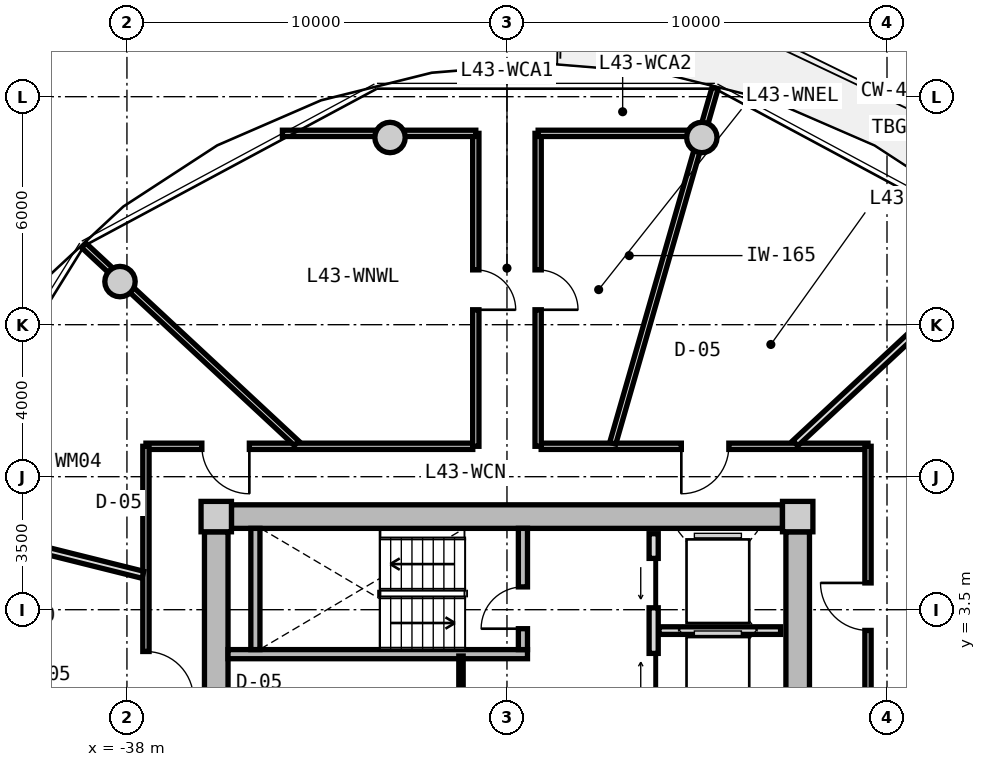
"""IFC4 building model, lengths in metres.
Left out: names, types, materials, properties, quantities, classifications, styles, units other than length and angle.
Written with IfcOpenShell. Run it as: python <this file> out.ifc"""

import sys

from ifc_helpers import new_model, si_unit, direction, frame, frame_2d, origin, origin_2d, place, context, subcontext, project, spatial, rectangle, circle, extrude, source, transform, mapped, element, fill, save


model = new_model("IFC4")
c1 = context("Model", 3, precision=1e-05, world=origin(), true_north=direction((0.0, 1.0)))
c2 = subcontext(c1, "Body", "Model", "MODEL_VIEW")
j1 = project(units=[si_unit("LENGTHUNIT", "METRE"), si_unit("PLANEANGLEUNIT", "RADIAN")], contexts=[c1])
p1 = place(None, origin())
s1 = spatial("IfcSite", under=j1, at=p1, CompositionType="ELEMENT")
p2 = place(p1, origin())
s2 = spatial("IfcBuilding", under=s1, at=p2, CompositionType="ELEMENT")
p3 = place(p2, frame((0.0, 0.0, 140.4)))
s3 = spatial("IfcBuildingStorey", under=s2, at=p3, CompositionType="ELEMENT", Elevation=140.4)
m1 = source(origin(), c2, "Body", "SweptSolid", [
    extrude(rectangle(XDim=0.8, YDim=0.8, at=origin_2d()), origin(), (0.0, 0.0, 1.0), 3.05),
])
for number, where, z_axis, x_axis in (
    (1, (-20.35, 5.95, 0.0), (0.0, 0.0, 1.0), (1.0, 0.0, 0.0)),
    (2, (-35.65, 5.95, 0.0), (0.0, 0.0, 1.0), (1.0, 0.0, 0.0)),
):
    element("IfcColumn", number, at=place(p3, frame(where, z_axis=z_axis, x_axis=x_axis)), inside=s3, PredefinedType="COLUMN", context=c2, shape_type="MappedRepresentation", body=[
        mapped(m1, transform((0.0, 0.0, 0.0), x_axis=(1.0, 0.0, 0.0), y_axis=(0.0, 1.0, 0.0), z_axis=(0.0, 0.0, 1.0), scale=1.0)),
    ])
m2 = source(origin(), c2, "Body", "SweptSolid", [
    extrude(rectangle(XDim=14.5, YDim=0.62, at=frame_2d((7.25, 0.0))), origin(), (0.0, 0.0, 1.0), 2.81),
])
p4 = place(p3, frame((-35.25, 5.95, 0.0), z_axis=(0.0, 0.0, 1.0), x_axis=(1.0, 0.0, 0.0)))
e3 = element("IfcWall", 3, at=p4, inside=s3, PredefinedType="SHEAR", context=c2, shape_type="MappedRepresentation", body=[
    mapped(m2, transform((0.0, 0.0, 0.0), x_axis=(1.0, 0.0, 0.0), y_axis=(0.0, 1.0, 0.0), z_axis=(0.0, 0.0, 1.0), scale=1.0)),
])
m3 = source(origin(), c2, "Body", "SweptSolid", [
    extrude(rectangle(XDim=11.1, YDim=0.62, at=frame_2d((5.55, 0.0))), origin(), (0.0, 0.0, 1.0), 2.81),
])
p5 = place(p3, frame((-35.65, -5.55, 0.0), z_axis=(0.0, 0.0, 1.0), x_axis=(0.0, 1.0, 0.0)))
e4 = element("IfcWall", 4, at=p5, inside=s3, PredefinedType="SHEAR", context=c2, shape_type="MappedRepresentation", body=[
    mapped(m3, transform((0.0, 0.0, 0.0), x_axis=(1.0, 0.0, 0.0), y_axis=(0.0, 1.0, 0.0), z_axis=(0.0, 0.0, 1.0), scale=1.0)),
])
p6 = place(p5, frame((3.8, 0.0, 0.0)))
e5 = element("IfcOpeningElement", 5, at=p6, cuts=e4, PredefinedType="OPENING", context=c2, shape_type="SweptSolid", body=[
    extrude(rectangle(XDim=1.2, YDim=2.15, at=frame_2d((0.6, 1.075))), frame((0.0, 0.32, 0.0), z_axis=(0.0, -1.0, 0.0), x_axis=(1.0, 0.0, 0.0)), (0.0, 0.0, 1.0), 0.64),
])
p7 = place(p3, frame((-20.35, 5.55, 0.0), z_axis=(0.0, 0.0, 1.0), x_axis=(0.0, -1.0, 0.0)))
e6 = element("IfcWall", 6, at=p7, inside=s3, PredefinedType="SHEAR", context=c2, shape_type="MappedRepresentation", body=[
    mapped(m3, transform((0.0, 0.0, 0.0), x_axis=(1.0, 0.0, 0.0), y_axis=(0.0, 1.0, 0.0), z_axis=(0.0, 0.0, 1.0), scale=1.0)),
])
p8 = place(p7, frame((5.65, 0.0, 0.0)))
e7 = element("IfcOpeningElement", 7, at=p8, cuts=e6, PredefinedType="OPENING", context=c2, shape_type="SweptSolid", body=[
    extrude(rectangle(XDim=1.2, YDim=2.15, at=frame_2d((0.6, 1.075))), frame((0.0, 0.32, 0.0), z_axis=(0.0, -1.0, 0.0), x_axis=(1.0, 0.0, 0.0)), (0.0, 0.0, 1.0), 0.64),
])
m4 = source(origin(), c2, "Body", "SweptSolid", [
    extrude(circle(Radius=0.4, at=origin_2d()), origin(), (0.0, 0.0, 1.0), 3.05),
])
for number, where, z_axis, x_axis in (
    (8, (-22.873, 15.926, 0.0), (0.0, 0.0, 1.0), (1.0, 0.0, 0.0)),
    (9, (-31.077, 15.926, 0.0), (0.0, 0.0, 1.0), (1.0, 0.0, 0.0)),
    (10, (-38.183, 12.135, 0.0), (0.0, 0.0, 1.0), (1.0, 0.0, 0.0)),
):
    element("IfcColumn", number, at=place(p3, frame(where, z_axis=z_axis, x_axis=x_axis)), inside=s3, PredefinedType="COLUMN", context=c2, shape_type="MappedRepresentation", body=[
        mapped(m4, transform((0.0, 0.0, 0.0), x_axis=(1.0, 0.0, 0.0), y_axis=(0.0, 1.0, 0.0), z_axis=(0.0, 0.0, 1.0), scale=1.0)),
    ])
m5 = source(origin(), c2, "Body", "SweptSolid", [
    extrude(rectangle(XDim=7.88, YDim=0.24, at=frame_2d((3.94, 0.0))), origin(), (0.0, 0.0, 1.0), 2.81),
])
p9 = place(p3, frame((-35.34, 2.33, 0.0), z_axis=(0.0, 0.0, 1.0), x_axis=(1.0, 0.0, 0.0)))
e11 = element("IfcWall", 11, at=p9, inside=s3, PredefinedType="PARTITIONING", context=c2, shape_type="MappedRepresentation", body=[
    mapped(m5, transform((0.0, 0.0, 0.0), x_axis=(1.0, 0.0, 0.0), y_axis=(0.0, 1.0, 0.0), z_axis=(0.0, 0.0, 1.0), scale=1.0)),
])
m6 = source(origin(), c2, "Body", "SweptSolid", [
    extrude(rectangle(XDim=3.19, YDim=0.24, at=frame_2d((1.595, 0.0))), origin(), (0.0, 0.0, 1.0), 2.81),
])
p10 = place(p3, frame((-34.62, 2.45, 0.0), z_axis=(0.0, 0.0, 1.0), x_axis=(0.0, 1.0, 0.0)))
e12 = element("IfcWall", 12, at=p10, inside=s3, PredefinedType="PARTITIONING", context=c2, shape_type="MappedRepresentation", body=[
    mapped(m6, transform((0.0, 0.0, 0.0), x_axis=(1.0, 0.0, 0.0), y_axis=(0.0, 1.0, 0.0), z_axis=(0.0, 0.0, 1.0), scale=1.0)),
])
p11 = place(p3, frame((-27.58, 2.45, 0.0), z_axis=(0.0, 0.0, 1.0), x_axis=(0.0, 1.0, 0.0)))
e13 = element("IfcWall", 13, at=p11, inside=s3, PredefinedType="PARTITIONING", context=c2, shape_type="MappedRepresentation", body=[
    mapped(m6, transform((0.0, 0.0, 0.0), x_axis=(1.0, 0.0, 0.0), y_axis=(0.0, 1.0, 0.0), z_axis=(0.0, 0.0, 1.0), scale=1.0)),
])
p12 = place(p11, frame((0.55, 0.0, 0.0)))
e14 = element("IfcOpeningElement", 14, at=p12, cuts=e13, PredefinedType="OPENING", context=c2, shape_type="SweptSolid", body=[
    extrude(rectangle(XDim=1.1, YDim=2.15, at=frame_2d((0.55, 1.075))), frame((0.0, 0.13, 0.0), z_axis=(0.0, -1.0, 0.0), x_axis=(1.0, 0.0, 0.0)), (0.0, 0.0, 1.0), 0.26),
])
m7 = source(origin(), c2, "Body", "SweptSolid", [
    extrude(rectangle(XDim=5.0, YDim=0.24, at=frame_2d((2.5, 0.0))), origin(), (0.0, 0.0, 1.0), 2.795),
])
p13 = place(p3, frame((-24.14, 0.5, 0.0), z_axis=(0.0, 0.0, 1.0), x_axis=(0.0, 1.0, 0.0)))
e15 = element("IfcWall", 15, at=p13, inside=s3, PredefinedType="PARTITIONING", context=c2, shape_type="MappedRepresentation", body=[
    mapped(m7, transform((0.0, 0.0, 0.0), x_axis=(1.0, 0.0, 0.0), y_axis=(0.0, 1.0, 0.0), z_axis=(0.0, 0.0, 1.0), scale=1.0)),
])
p14 = place(p13, frame((3.05, 0.0, 0.0)))
e16 = element("IfcOpeningElement", 16, at=p14, cuts=e15, PredefinedType="OPENING", context=c2, shape_type="SweptSolid", body=[
    extrude(rectangle(XDim=1.3, YDim=2.2, at=frame_2d((0.65, 1.1))), frame((0.0, 0.13, 0.0), z_axis=(0.0, -1.0, 0.0), x_axis=(1.0, 0.0, 0.0)), (0.0, 0.0, 1.0), 0.26),
])
p15 = place(p13, frame((0.55, 0.0, 0.0)))
e17 = element("IfcOpeningElement", 17, at=p15, cuts=e15, PredefinedType="OPENING", context=c2, shape_type="SweptSolid", body=[
    extrude(rectangle(XDim=1.3, YDim=2.2, at=frame_2d((0.65, 1.1))), frame((0.0, 0.13, 0.0), z_axis=(0.0, -1.0, 0.0), x_axis=(1.0, 0.0, 0.0)), (0.0, 0.0, 1.0), 0.26),
])
m8 = source(origin(), c2, "Body", "SweptSolid", [
    extrude(rectangle(XDim=3.2, YDim=0.2, at=frame_2d((1.6, 0.0))), origin(), (0.0, 0.0, 1.0), 2.795),
])
p16 = place(p3, frame((-24.0, 2.95, 0.0), z_axis=(0.0, 0.0, 1.0), x_axis=(1.0, 0.0, 0.0)))
e18 = element("IfcWall", 18, at=p16, inside=s3, PredefinedType="PARTITIONING", context=c2, shape_type="MappedRepresentation", body=[
    mapped(m8, transform((0.0, 0.0, 0.0), x_axis=(1.0, 0.0, 0.0), y_axis=(0.0, 1.0, 0.0), z_axis=(0.0, 0.0, 1.0), scale=1.0)),
])
m9 = source(origin(), c2, "Body", "SweptSolid", [
    extrude(rectangle(XDim=2.33, YDim=0.115, at=frame_2d((1.165, 0.0))), origin(), (0.0, 0.0, 1.0), 2.795),
])
p17 = place(p3, frame((-29.21, -0.05, 0.0), z_axis=(0.0, 0.0, 1.0), x_axis=(0.0, 1.0, 0.0)))
e19 = element("IfcWall", 19, at=p17, inside=s3, PredefinedType="PARTITIONING", context=c2, shape_type="MappedRepresentation", body=[
    mapped(m9, transform((0.0, 0.0, 0.0), x_axis=(1.0, 0.0, 0.0), y_axis=(0.0, 1.0, 0.0), z_axis=(0.0, 0.0, 1.0), scale=1.0)),
])
m10 = source(origin(), c2, "Body", "SweptSolid", [
    extrude(rectangle(XDim=8.6, YDim=0.165, at=frame_2d((4.3, 0.0))), origin(), (0.0, 0.0, 1.0), 2.795),
])
p18 = place(p3, frame((-37.5, 7.8, 0.0), z_axis=(0.0, 0.0, 1.0), x_axis=(1.0, 0.0, 0.0)))
e20 = element("IfcWall", 20, at=p18, inside=s3, PredefinedType="PARTITIONING", context=c2, shape_type="MappedRepresentation", body=[
    mapped(m10, transform((0.0, 0.0, 0.0), x_axis=(1.0, 0.0, 0.0), y_axis=(0.0, 1.0, 0.0), z_axis=(0.0, 0.0, 1.0), scale=1.0)),
])
p19 = place(p18, frame((1.471, 0.0, 0.0)))
e21 = element("IfcOpeningElement", 21, at=p19, cuts=e20, PredefinedType="OPENING", context=c2, shape_type="SweptSolid", body=[
    extrude(rectangle(XDim=1.25, YDim=2.2, at=frame_2d((0.625, 1.1))), frame((0.0, 0.093, 0.0), z_axis=(0.0, -1.0, 0.0), x_axis=(1.0, 0.0, 0.0)), (0.0, 0.0, 1.0), 0.185),
])
p20 = place(p3, frame((-27.1, 7.8, 0.0), z_axis=(0.0, 0.0, 1.0), x_axis=(1.0, 0.0, 0.0)))
e22 = element("IfcWall", 22, at=p20, inside=s3, PredefinedType="PARTITIONING", context=c2, shape_type="MappedRepresentation", body=[
    mapped(m10, transform((0.0, 0.0, 0.0), x_axis=(1.0, 0.0, 0.0), y_axis=(0.0, 1.0, 0.0), z_axis=(0.0, 0.0, 1.0), scale=1.0)),
])
p21 = place(p20, frame((3.688, 0.0, 0.0)))
e23 = element("IfcOpeningElement", 23, at=p21, cuts=e22, PredefinedType="OPENING", context=c2, shape_type="SweptSolid", body=[
    extrude(rectangle(XDim=1.25, YDim=2.2, at=frame_2d((0.625, 1.1))), frame((0.0, 0.093, 0.0), z_axis=(0.0, -1.0, 0.0), x_axis=(1.0, 0.0, 0.0)), (0.0, 0.0, 1.0), 0.185),
])
m11 = source(origin(), c2, "Body", "SweptSolid", [
    extrude(rectangle(XDim=15.6, YDim=0.165, at=frame_2d((7.8, 0.0))), origin(), (0.0, 0.0, 1.0), 2.795),
])
p22 = place(p3, frame((-37.5, -7.8, 0.0), z_axis=(0.0, 0.0, 1.0), x_axis=(0.0, 1.0, 0.0)))
e24 = element("IfcWall", 24, at=p22, inside=s3, PredefinedType="PARTITIONING", context=c2, shape_type="MappedRepresentation", body=[
    mapped(m11, transform((0.0, 0.0, 0.0), x_axis=(1.0, 0.0, 0.0), y_axis=(0.0, 1.0, 0.0), z_axis=(0.0, 0.0, 1.0), scale=1.0)),
])
p23 = place(p22, frame((8.95, 0.0, 0.0)))
e25 = element("IfcOpeningElement", 25, at=p23, cuts=e24, PredefinedType="OPENING", context=c2, shape_type="SweptSolid", body=[
    extrude(rectangle(XDim=1.25, YDim=2.2, at=frame_2d((0.625, 1.1))), frame((0.0, 0.093, 0.0), z_axis=(0.0, -1.0, 0.0), x_axis=(1.0, 0.0, 0.0)), (0.0, 0.0, 1.0), 0.185),
])
p24 = place(p22, frame((4.851, 0.0, 0.0)))
e26 = element("IfcOpeningElement", 26, at=p24, cuts=e24, PredefinedType="OPENING", context=c2, shape_type="SweptSolid", body=[
    extrude(rectangle(XDim=1.05, YDim=2.15, at=frame_2d((0.525, 1.075))), frame((0.0, 0.093, 0.0), z_axis=(0.0, -1.0, 0.0), x_axis=(1.0, 0.0, 0.0)), (0.0, 0.0, 1.0), 0.185),
])
p25 = place(p22, frame((1.488, 0.0, 0.0)))
e27 = element("IfcOpeningElement", 27, at=p25, cuts=e24, PredefinedType="OPENING", context=c2, shape_type="SweptSolid", body=[
    extrude(rectangle(XDim=1.05, YDim=2.15, at=frame_2d((0.525, 1.075))), frame((0.0, 0.093, 0.0), z_axis=(0.0, -1.0, 0.0), x_axis=(1.0, 0.0, 0.0)), (0.0, 0.0, 1.0), 0.185),
])
p26 = place(p3, frame((-18.5, 7.8, 0.0), z_axis=(0.0, 0.0, 1.0), x_axis=(0.0, -1.0, 0.0)))
e28 = element("IfcWall", 28, at=p26, inside=s3, PredefinedType="PARTITIONING", context=c2, shape_type="MappedRepresentation", body=[
    mapped(m11, transform((0.0, 0.0, 0.0), x_axis=(1.0, 0.0, 0.0), y_axis=(0.0, 1.0, 0.0), z_axis=(0.0, 0.0, 1.0), scale=1.0)),
])
p27 = place(p26, frame((10.881, 0.0, 0.0)))
e29 = element("IfcOpeningElement", 29, at=p27, cuts=e28, PredefinedType="OPENING", context=c2, shape_type="SweptSolid", body=[
    extrude(rectangle(XDim=1.05, YDim=2.15, at=frame_2d((0.525, 1.075))), frame((0.0, 0.093, 0.0), z_axis=(0.0, -1.0, 0.0), x_axis=(1.0, 0.0, 0.0)), (0.0, 0.0, 1.0), 0.185),
])
p28 = place(p26, frame((8.844, 0.0, 0.0)))
e30 = element("IfcOpeningElement", 30, at=p28, cuts=e28, PredefinedType="OPENING", context=c2, shape_type="SweptSolid", body=[
    extrude(rectangle(XDim=1.05, YDim=2.15, at=frame_2d((0.525, 1.075))), frame((0.0, 0.093, 0.0), z_axis=(0.0, -1.0, 0.0), x_axis=(1.0, 0.0, 0.0)), (0.0, 0.0, 1.0), 0.185),
])
p29 = place(p26, frame((3.596, 0.0, 0.0)))
e31 = element("IfcOpeningElement", 31, at=p29, cuts=e28, PredefinedType="OPENING", context=c2, shape_type="SweptSolid", body=[
    extrude(rectangle(XDim=1.25, YDim=2.2, at=frame_2d((0.625, 1.1))), frame((0.0, 0.093, 0.0), z_axis=(0.0, -1.0, 0.0), x_axis=(1.0, 0.0, 0.0)), (0.0, 0.0, 1.0), 0.185),
])
m12 = source(origin(), c2, "Body", "SweptSolid", [
    extrude(rectangle(XDim=9.73, YDim=0.165, at=frame_2d((4.865, 0.0))), origin(), (0.0, 0.0, 1.0), 2.345),
])
p30 = place(p3, frame((-25.217, 7.88, 0.0), z_axis=(0.0, 0.0, 1.0), x_axis=(0.27679492614, 0.960929013436, 0.0)))
e32 = element("IfcWall", 32, at=p30, inside=s3, PredefinedType="PARTITIONING", context=c2, shape_type="MappedRepresentation", body=[
    mapped(m12, transform((0.0, 0.0, 0.0), x_axis=(1.0, 0.0, 0.0), y_axis=(0.0, 1.0, 0.0), z_axis=(0.0, 0.0, 1.0), scale=1.0)),
])
m13 = source(origin(), c2, "Body", "SweptSolid", [
    extrude(rectangle(XDim=7.648, YDim=0.165, at=frame_2d((3.824, 0.0))), origin(), (0.0, 0.0, 1.0), 2.345),
])
p31 = place(p3, frame((-33.538, 7.88, 0.0), z_axis=(0.0, 0.0, 1.0), x_axis=(-0.732167856666, 0.681124239522, 0.0)))
e33 = element("IfcWall", 33, at=p31, inside=s3, PredefinedType="PARTITIONING", context=c2, shape_type="MappedRepresentation", body=[
    mapped(m13, transform((0.0, 0.0, 0.0), x_axis=(1.0, 0.0, 0.0), y_axis=(0.0, 1.0, 0.0), z_axis=(0.0, 0.0, 1.0), scale=1.0)),
])
m14 = source(origin(), c2, "Body", "SweptSolid", [
    extrude(rectangle(XDim=8.235, YDim=0.165, at=frame_2d((4.118, 0.0))), origin(), (0.0, 0.0, 1.0), 2.795),
])
p32 = place(p3, frame((-28.82, 7.8, 0.0), z_axis=(0.0, 0.0, 1.0), x_axis=(0.0, 1.0, 0.0)))
e34 = element("IfcWall", 34, at=p32, inside=s3, PredefinedType="PARTITIONING", context=c2, shape_type="MappedRepresentation", body=[
    mapped(m14, transform((0.0, 0.0, 0.0), x_axis=(1.0, 0.0, 0.0), y_axis=(0.0, 1.0, 0.0), z_axis=(0.0, 0.0, 1.0), scale=1.0)),
])
p33 = place(p32, frame((3.593, 0.0, 0.0)))
e35 = element("IfcOpeningElement", 35, at=p33, cuts=e34, PredefinedType="OPENING", context=c2, shape_type="SweptSolid", body=[
    extrude(rectangle(XDim=1.05, YDim=2.15, at=frame_2d((0.525, 1.075))), frame((0.0, 0.093, 0.0), z_axis=(0.0, -1.0, 0.0), x_axis=(1.0, 0.0, 0.0)), (0.0, 0.0, 1.0), 0.185),
])
m15 = source(origin(), c2, "Body", "SweptSolid", [
    extrude(rectangle(XDim=5.089, YDim=0.165, at=frame_2d((2.544, 0.0))), origin(), (0.0, 0.0, 1.0), 2.345),
])
p34 = place(p3, frame((-33.909, 16.035, 0.0), z_axis=(0.0, 0.0, 1.0), x_axis=(1.0, 0.0, 0.0)))
e36 = element("IfcWall", 36, at=p34, inside=s3, PredefinedType="PARTITIONING", context=c2, shape_type="MappedRepresentation", body=[
    mapped(m15, transform((0.0, 0.0, 0.0), x_axis=(1.0, 0.0, 0.0), y_axis=(0.0, 1.0, 0.0), z_axis=(0.0, 0.0, 1.0), scale=1.0)),
])
p35 = place(p3, frame((-27.18, 7.8, 0.0), z_axis=(0.0, 0.0, 1.0), x_axis=(0.0, 1.0, 0.0)))
e37 = element("IfcWall", 37, at=p35, inside=s3, PredefinedType="PARTITIONING", context=c2, shape_type="MappedRepresentation", body=[
    mapped(m14, transform((0.0, 0.0, 0.0), x_axis=(1.0, 0.0, 0.0), y_axis=(0.0, 1.0, 0.0), z_axis=(0.0, 0.0, 1.0), scale=1.0)),
])
p36 = place(p35, frame((3.593, 0.0, 0.0)))
e38 = element("IfcOpeningElement", 38, at=p36, cuts=e37, PredefinedType="OPENING", context=c2, shape_type="SweptSolid", body=[
    extrude(rectangle(XDim=1.05, YDim=2.15, at=frame_2d((0.525, 1.075))), frame((0.0, 0.093, 0.0), z_axis=(0.0, -1.0, 0.0), x_axis=(1.0, 0.0, 0.0)), (0.0, 0.0, 1.0), 0.185),
])
m16 = source(origin(), c2, "Body", "SweptSolid", [
    extrude(rectangle(XDim=4.469, YDim=0.165, at=frame_2d((2.234, 0.0))), origin(), (0.0, 0.0, 1.0), 2.345),
])
p37 = place(p3, frame((-27.18, 16.035, 0.0), z_axis=(0.0, 0.0, 1.0), x_axis=(1.0, 0.0, 0.0)))
e39 = element("IfcWall", 39, at=p37, inside=s3, PredefinedType="PARTITIONING", context=c2, shape_type="MappedRepresentation", body=[
    mapped(m16, transform((0.0, 0.0, 0.0), x_axis=(1.0, 0.0, 0.0), y_axis=(0.0, 1.0, 0.0), z_axis=(0.0, 0.0, 1.0), scale=1.0)),
])
m17 = source(origin(), c2, "Body", "SweptSolid", [
    extrude(rectangle(XDim=6.193, YDim=0.19, at=frame_2d((3.096, 0.0))), origin(), (0.0, 0.0, 1.0), 2.345),
])
p38 = place(p3, frame((-37.58, 4.419, 0.0), z_axis=(0.0, 0.0, 1.0), x_axis=(-0.970309243466, 0.241867674657, 0.0)))
e40 = element("IfcWall", 40, at=p38, inside=s3, PredefinedType="PARTITIONING", context=c2, shape_type="MappedRepresentation", body=[
    mapped(m17, transform((0.0, 0.0, 0.0), x_axis=(1.0, 0.0, 0.0), y_axis=(0.0, 1.0, 0.0), z_axis=(0.0, 0.0, 1.0), scale=1.0)),
])
m18 = source(origin(), c2, "Body", "SweptSolid", [
    extrude(rectangle(XDim=7.648, YDim=0.19, at=frame_2d((3.824, 0.0))), origin(), (0.0, 0.0, 1.0), 2.345),
])
p39 = place(p3, frame((-20.413, 7.88, 0.0), z_axis=(0.0, 0.0, 1.0), x_axis=(0.732182665826, 0.681108320213, 0.0)))
e41 = element("IfcWall", 41, at=p39, inside=s3, PredefinedType="PARTITIONING", context=c2, shape_type="MappedRepresentation", body=[
    mapped(m18, transform((0.0, 0.0, 0.0), x_axis=(1.0, 0.0, 0.0), y_axis=(0.0, 1.0, 0.0), z_axis=(0.0, 0.0, 1.0), scale=1.0)),
])
m19 = source(origin(), c2, "Body", "SweptSolid", [
    extrude(rectangle(XDim=1.1, YDim=2.15, at=frame_2d((0.55, 1.075))), frame((0.0, 0.025, 0.0), z_axis=(0.0, -1.0, 0.0), x_axis=(1.0, 0.0, 0.0)), (0.0, 0.0, 1.0), 0.05),
])
p40 = place(p12, origin())
e42 = element("IfcDoor", 42, at=p40, inside=s3, OperationType="SINGLE_SWING_LEFT", PredefinedType="DOOR", context=c2, shape_type="MappedRepresentation", body=[
    mapped(m19, transform((0.0, 0.0, 0.0), x_axis=(1.0, 0.0, 0.0), y_axis=(0.0, 1.0, 0.0), z_axis=(0.0, 0.0, 1.0), scale=1.0)),
])
fill(e14, e42)
m20 = source(origin(), c2, "Body", "SweptSolid", [
    extrude(rectangle(XDim=1.3, YDim=2.2, at=frame_2d((0.65, 1.1))), frame((0.0, 0.025, 0.0), z_axis=(0.0, -1.0, 0.0), x_axis=(1.0, 0.0, 0.0)), (0.0, 0.0, 1.0), 0.05),
])
p41 = place(p14, origin())
e43 = element("IfcDoor", 43, at=p41, inside=s3, OperationType="SLIDING_TO_LEFT", PredefinedType="DOOR", context=c2, shape_type="MappedRepresentation", body=[
    mapped(m20, transform((0.0, 0.0, 0.0), x_axis=(1.0, 0.0, 0.0), y_axis=(0.0, 1.0, 0.0), z_axis=(0.0, 0.0, 1.0), scale=1.0)),
])
fill(e16, e43)
p42 = place(p15, origin())
e44 = element("IfcDoor", 44, at=p42, inside=s3, OperationType="SLIDING_TO_RIGHT", PredefinedType="DOOR", context=c2, shape_type="MappedRepresentation", body=[
    mapped(m20, transform((0.0, 0.0, 0.0), x_axis=(1.0, 0.0, 0.0), y_axis=(0.0, 1.0, 0.0), z_axis=(0.0, 0.0, 1.0), scale=1.0)),
])
fill(e17, e44)
m21 = source(origin(), c2, "Body", "SweptSolid", [
    extrude(rectangle(XDim=1.05, YDim=2.15, at=frame_2d((0.525, 1.075))), frame((0.0, 0.025, 0.0), z_axis=(0.0, -1.0, 0.0), x_axis=(1.0, 0.0, 0.0)), (0.0, 0.0, 1.0), 0.05),
])
p43 = place(p33, frame((1.05, 0.0, 0.0), z_axis=(0.0, 0.0, 1.0), x_axis=(-1.0, 0.0, 0.0)))
e45 = element("IfcDoor", 45, at=p43, inside=s3, OperationType="SINGLE_SWING_RIGHT", PredefinedType="DOOR", context=c2, shape_type="MappedRepresentation", body=[
    mapped(m21, transform((0.0, 0.0, 0.0), x_axis=(1.0, 0.0, 0.0), y_axis=(0.0, 1.0, 0.0), z_axis=(0.0, 0.0, 1.0), scale=1.0)),
])
fill(e35, e45)
p44 = place(p36, frame((1.05, 0.0, 0.0), z_axis=(0.0, 0.0, 1.0), x_axis=(-1.0, 0.0, 0.0)))
e46 = element("IfcDoor", 46, at=p44, inside=s3, OperationType="SINGLE_SWING_RIGHT", PredefinedType="DOOR", context=c2, shape_type="MappedRepresentation", body=[
    mapped(m21, transform((0.0, 0.0, 0.0), x_axis=(1.0, 0.0, 0.0), y_axis=(0.0, 1.0, 0.0), z_axis=(0.0, 0.0, 1.0), scale=1.0)),
])
fill(e38, e46)
m22 = source(origin(), c2, "Body", "SweptSolid", [
    extrude(rectangle(XDim=1.25, YDim=2.2, at=frame_2d((0.625, 1.1))), frame((0.0, 0.025, 0.0), z_axis=(0.0, -1.0, 0.0), x_axis=(1.0, 0.0, 0.0)), (0.0, 0.0, 1.0), 0.05),
])
p45 = place(p19, frame((1.25, 0.0, 0.0), z_axis=(0.0, 0.0, 1.0), x_axis=(-1.0, 0.0, 0.0)))
e47 = element("IfcDoor", 47, at=p45, inside=s3, OperationType="SINGLE_SWING_LEFT", PredefinedType="DOOR", context=c2, shape_type="MappedRepresentation", body=[
    mapped(m22, transform((0.0, 0.0, 0.0), x_axis=(1.0, 0.0, 0.0), y_axis=(0.0, 1.0, 0.0), z_axis=(0.0, 0.0, 1.0), scale=1.0)),
])
fill(e21, e47)
p46 = place(p23, frame((1.25, 0.0, 0.0), z_axis=(0.0, 0.0, 1.0), x_axis=(-1.0, 0.0, 0.0)))
e48 = element("IfcDoor", 48, at=p46, inside=s3, OperationType="SINGLE_SWING_RIGHT", PredefinedType="DOOR", context=c2, shape_type="MappedRepresentation", body=[
    mapped(m22, transform((0.0, 0.0, 0.0), x_axis=(1.0, 0.0, 0.0), y_axis=(0.0, 1.0, 0.0), z_axis=(0.0, 0.0, 1.0), scale=1.0)),
])
fill(e25, e48)
p47 = place(p29, frame((1.25, 0.0, 0.0), z_axis=(0.0, 0.0, 1.0), x_axis=(-1.0, 0.0, 0.0)))
e49 = element("IfcDoor", 49, at=p47, inside=s3, OperationType="SINGLE_SWING_RIGHT", PredefinedType="DOOR", context=c2, shape_type="MappedRepresentation", body=[
    mapped(m22, transform((0.0, 0.0, 0.0), x_axis=(1.0, 0.0, 0.0), y_axis=(0.0, 1.0, 0.0), z_axis=(0.0, 0.0, 1.0), scale=1.0)),
])
fill(e31, e49)
p48 = place(p21, frame((1.25, 0.0, 0.0), z_axis=(0.0, 0.0, 1.0), x_axis=(-1.0, 0.0, 0.0)))
e50 = element("IfcDoor", 50, at=p48, inside=s3, OperationType="SINGLE_SWING_RIGHT", PredefinedType="DOOR", context=c2, shape_type="MappedRepresentation", body=[
    mapped(m22, transform((0.0, 0.0, 0.0), x_axis=(1.0, 0.0, 0.0), y_axis=(0.0, 1.0, 0.0), z_axis=(0.0, 0.0, 1.0), scale=1.0)),
])
fill(e23, e50)
save(model, sys.argv[1])
